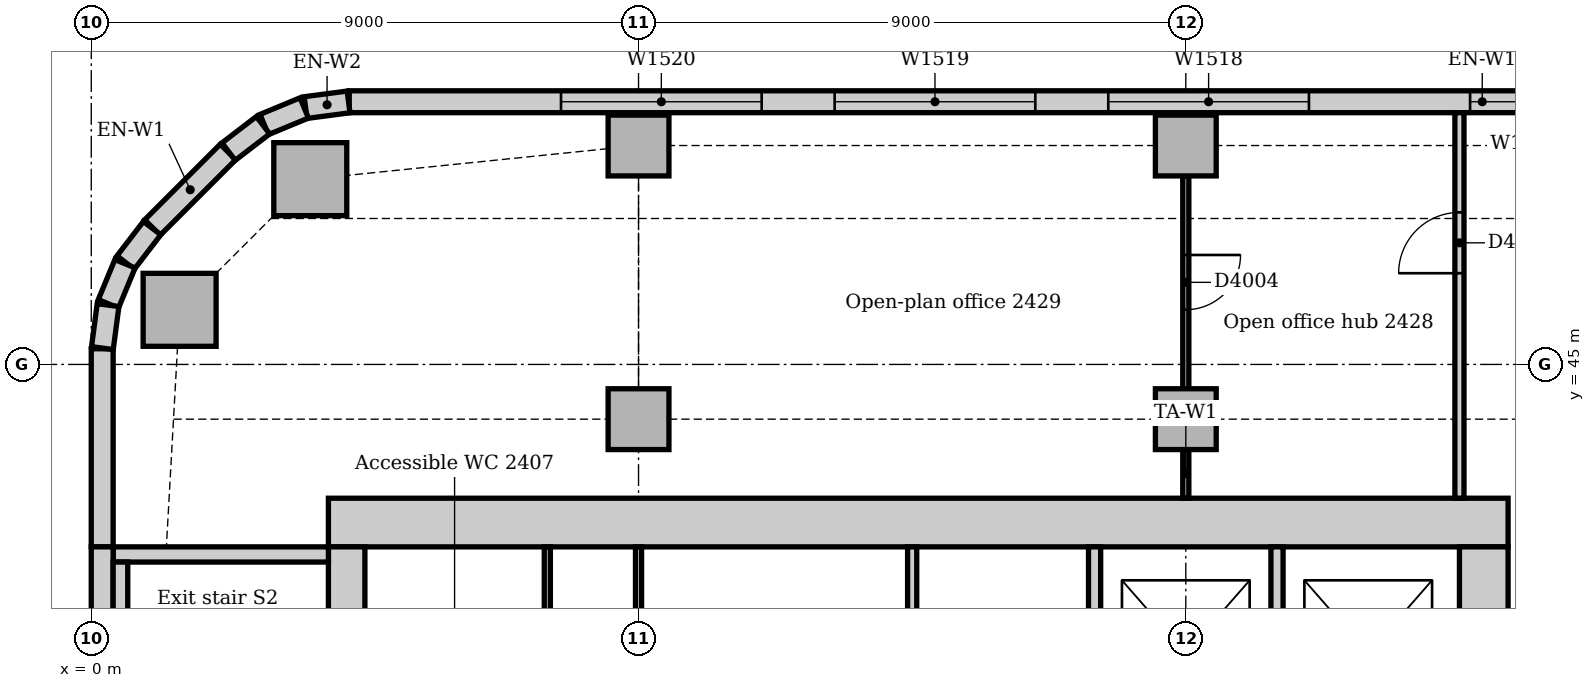
"""IFC4 building model, lengths in metres.
Left out: names, types, materials, properties, quantities, classifications, styles, units other than length and angle.
Written with IfcOpenShell. Run it as: python <this file> out.ifc"""

import sys

from ifc_helpers import new_model, si_unit, direction, frame, frame_2d, origin, origin_2d, place, context, subcontext, project, spatial, rectangle, extrude, element, fill, save


model = new_model("IFC4")
c1 = context("Model", 3, precision=1e-05, world=origin(), true_north=direction((0.0, 1.0)))
c2 = subcontext(c1, "Body", "Model", "MODEL_VIEW")
j1 = project(units=[si_unit("LENGTHUNIT", "METRE"), si_unit("PLANEANGLEUNIT", "RADIAN")], contexts=[c1])
p1 = place(None, origin())
s1 = spatial("IfcSite", under=j1, at=p1, CompositionType="ELEMENT")
p2 = place(p1, origin())
s2 = spatial("IfcBuilding", under=s1, at=p2, CompositionType="ELEMENT")
p3 = place(p2, frame((0.0, 0.0, 104.0)))
s3 = spatial("IfcBuildingStorey", under=s2, at=p3, CompositionType="ELEMENT", Elevation=104.0)
p4 = place(p3, frame((23.3, 42.4, 0.0), z_axis=(0.0, 0.0, 1.0), x_axis=(-1.0, 0.0, 0.0)))
e1 = element("IfcWall", 1, at=p4, inside=s3, PredefinedType="SOLIDWALL", context=c2, shape_type="SweptSolid", body=[
    extrude(rectangle(XDim=19.4, YDim=0.8, at=frame_2d((9.7, 0.0))), origin(), (0.0, 0.0, 1.0), 4.0),
])
p5 = place(p3, frame((22.9, 31.5, 0.0), z_axis=(0.0, 0.0, 1.0), x_axis=(0.0, 1.0, 0.0)))
e2 = element("IfcWall", 2, at=p5, inside=s3, PredefinedType="SOLIDWALL", context=c2, shape_type="SweptSolid", body=[
    extrude(rectangle(XDim=10.5, YDim=0.8, at=frame_2d((5.25, 0.0))), origin(), (0.0, 0.0, 1.0), 4.0),
])
p6 = place(p5, frame((3.15, 0.0, 0.0)))
e3 = element("IfcOpeningElement", 3, at=p6, cuts=e2, PredefinedType="OPENING", context=c2, shape_type="SweptSolid", body=[
    extrude(rectangle(XDim=1.0, YDim=2.1, at=frame_2d((0.5, 1.05))), frame((0.0, 0.41, 0.0), z_axis=(0.0, -1.0, 0.0), x_axis=(1.0, 0.0, 0.0)), (0.0, 0.0, 1.0), 0.82),
])
p7 = place(p5, frame((5.2, 0.0, 0.0)))
e4 = element("IfcOpeningElement", 4, at=p7, cuts=e2, PredefinedType="OPENING", context=c2, shape_type="SweptSolid", body=[
    extrude(rectangle(XDim=1.0, YDim=2.1, at=frame_2d((0.5, 1.05))), frame((0.0, 0.41, 0.0), z_axis=(0.0, -1.0, 0.0), x_axis=(1.0, 0.0, 0.0)), (0.0, 0.0, 1.0), 0.82),
])
p8 = place(p3, frame((4.2, 42.0, 0.0), z_axis=(0.0, 0.0, 1.0), x_axis=(0.0, -1.0, 0.0)))
e5 = element("IfcWall", 5, at=p8, inside=s3, PredefinedType="SOLIDWALL", context=c2, shape_type="SweptSolid", body=[
    extrude(rectangle(XDim=10.5, YDim=0.6, at=frame_2d((5.25, 0.0))), origin(), (0.0, 0.0, 1.0), 4.0),
])
p9 = place(p8, frame((5.3, 0.0, 0.0)))
e6 = element("IfcOpeningElement", 6, at=p9, cuts=e5, PredefinedType="OPENING", context=c2, shape_type="SweptSolid", body=[
    extrude(rectangle(XDim=1.0, YDim=2.1, at=frame_2d((0.5, 1.05))), frame((0.0, 0.31, 0.0), z_axis=(0.0, -1.0, 0.0), x_axis=(1.0, 0.0, 0.0)), (0.0, 0.0, 1.0), 0.62),
])
p10 = place(p3, frame((3.9, 41.875, 0.0), z_axis=(0.0, 0.0, 1.0), x_axis=(-1.0, 0.0, 0.0)))
e7 = element("IfcWall", 7, at=p10, inside=s3, PredefinedType="SOLIDWALL", context=c2, shape_type="SweptSolid", body=[
    extrude(rectangle(XDim=3.54, YDim=0.25, at=frame_2d((1.77, 0.0))), origin(), (0.0, 0.0, 1.0), 4.0),
])
for number, where, z_axis, x_axis in (
    (8, (3.602, 48.047, 0.0), (0.0, 0.0, 1.0), (1.0, 0.0, 0.0)),
    (9, (1.453, 45.898, 0.0), (0.0, 0.0, 1.0), (1.0, 0.0, 0.0)),
):
    element("IfcColumn", number, at=place(p3, frame(where, z_axis=z_axis, x_axis=x_axis)), inside=s3, PredefinedType="COLUMN", context=c2, shape_type="SweptSolid", body=[
        extrude(rectangle(XDim=1.2, YDim=1.2, at=origin_2d()), origin(), (0.0, 0.0, 1.0), 3.85),
    ])
for number, where, z_axis, x_axis in (
    (10, (9.0, 48.6, 0.0), (0.0, 0.0, 1.0), (1.0, 0.0, 0.0)),
    (11, (18.0, 48.6, 0.0), (0.0, 0.0, 1.0), (1.0, 0.0, 0.0)),
    (12, (9.0, 44.1, 0.0), (0.0, 0.0, 1.0), (1.0, 0.0, 0.0)),
    (13, (18.0, 44.1, 0.0), (0.0, 0.0, 1.0), (1.0, 0.0, 0.0)),
):
    element("IfcColumn", number, at=place(p3, frame(where, z_axis=z_axis, x_axis=x_axis)), inside=s3, PredefinedType="COLUMN", context=c2, shape_type="SweptSolid", body=[
        extrude(rectangle(XDim=1.0, YDim=1.0, at=origin_2d()), origin(), (0.0, 0.0, 1.0), 3.85),
    ])
p11 = place(p3, frame((41.507, 49.32, 0.0), z_axis=(0.0, 0.0, 1.0), x_axis=(-1.0, 0.0, 0.0)))
e14 = element("IfcWall", 14, at=p11, inside=s3, PredefinedType="STANDARD", context=c2, shape_type="SweptSolid", body=[
    extrude(rectangle(XDim=37.265, YDim=0.36, at=frame_2d((18.632, 0.0))), origin(), (0.0, 0.0, 1.0), 3.85),
])
p12 = place(p11, frame((3.482, 0.0, 0.9)))
e15 = element("IfcOpeningElement", 15, at=p12, cuts=e14, PredefinedType="OPENING", context=c2, shape_type="SweptSolid", body=[
    extrude(rectangle(XDim=3.3, YDim=1.6, at=frame_2d((1.65, 0.8))), frame((0.0, 0.19, 0.0), z_axis=(0.0, -1.0, 0.0), x_axis=(1.0, 0.0, 0.0)), (0.0, 0.0, 1.0), 0.38),
])
p13 = place(p11, frame((7.982, 0.0, 0.9)))
e16 = element("IfcOpeningElement", 16, at=p13, cuts=e14, PredefinedType="OPENING", context=c2, shape_type="SweptSolid", body=[
    extrude(rectangle(XDim=3.3, YDim=1.6, at=frame_2d((1.65, 0.8))), frame((0.0, 0.19, 0.0), z_axis=(0.0, -1.0, 0.0), x_axis=(1.0, 0.0, 0.0)), (0.0, 0.0, 1.0), 0.38),
])
p14 = place(p11, frame((12.482, 0.0, 0.9)))
e17 = element("IfcOpeningElement", 17, at=p14, cuts=e14, PredefinedType="OPENING", context=c2, shape_type="SweptSolid", body=[
    extrude(rectangle(XDim=3.3, YDim=1.6, at=frame_2d((1.65, 0.8))), frame((0.0, 0.19, 0.0), z_axis=(0.0, -1.0, 0.0), x_axis=(1.0, 0.0, 0.0)), (0.0, 0.0, 1.0), 0.38),
])
p15 = place(p11, frame((17.032, 0.0, 0.9)))
e18 = element("IfcOpeningElement", 18, at=p15, cuts=e14, PredefinedType="OPENING", context=c2, shape_type="SweptSolid", body=[
    extrude(rectangle(XDim=1.8, YDim=1.6, at=frame_2d((0.9, 0.8))), frame((0.0, 0.19, 0.0), z_axis=(0.0, -1.0, 0.0), x_axis=(1.0, 0.0, 0.0)), (0.0, 0.0, 1.0), 0.38),
])
p16 = place(p11, frame((21.482, 0.0, 0.9)))
e19 = element("IfcOpeningElement", 19, at=p16, cuts=e14, PredefinedType="OPENING", context=c2, shape_type="SweptSolid", body=[
    extrude(rectangle(XDim=3.3, YDim=1.6, at=frame_2d((1.65, 0.8))), frame((0.0, 0.19, 0.0), z_axis=(0.0, -1.0, 0.0), x_axis=(1.0, 0.0, 0.0)), (0.0, 0.0, 1.0), 0.38),
])
p17 = place(p11, frame((25.982, 0.0, 0.9)))
e20 = element("IfcOpeningElement", 20, at=p17, cuts=e14, PredefinedType="OPENING", context=c2, shape_type="SweptSolid", body=[
    extrude(rectangle(XDim=3.3, YDim=1.6, at=frame_2d((1.65, 0.8))), frame((0.0, 0.19, 0.0), z_axis=(0.0, -1.0, 0.0), x_axis=(1.0, 0.0, 0.0)), (0.0, 0.0, 1.0), 0.38),
])
p18 = place(p11, frame((30.482, 0.0, 0.9)))
e21 = element("IfcOpeningElement", 21, at=p18, cuts=e14, PredefinedType="OPENING", context=c2, shape_type="SweptSolid", body=[
    extrude(rectangle(XDim=3.3, YDim=1.6, at=frame_2d((1.65, 0.8))), frame((0.0, 0.19, 0.0), z_axis=(0.0, -1.0, 0.0), x_axis=(1.0, 0.0, 0.0)), (0.0, 0.0, 1.0), 0.38),
])
p19 = place(p3, frame((2.249, 48.494, 0.0), z_axis=(0.0, 0.0, 1.0), x_axis=(-0.707106781187, -0.707106781187, 0.0)))
e22 = element("IfcWall", 22, at=p19, inside=s3, PredefinedType="STANDARD", context=c2, shape_type="SweptSolid", body=[
    extrude(rectangle(XDim=1.757, YDim=0.36, at=frame_2d((0.879, 0.0))), origin(), (0.0, 0.0, 1.0), 3.85),
])
p20 = place(p3, frame((0.18, 45.257, 0.0), z_axis=(0.0, 0.0, 1.0), x_axis=(0.0, -1.0, 0.0)))
e23 = element("IfcWall", 23, at=p20, inside=s3, PredefinedType="STANDARD", context=c2, shape_type="SweptSolid", body=[
    extrude(rectangle(XDim=3.257, YDim=0.36, at=frame_2d((1.629, 0.0))), origin(), (0.0, 0.0, 1.0), 3.85),
])
p21 = place(p3, frame((0.18, 42.0, 0.0), z_axis=(0.0, 0.0, 1.0), x_axis=(0.0, -1.0, 0.0)))
e24 = element("IfcWall", 24, at=p21, inside=s3, PredefinedType="STANDARD", context=c2, shape_type="SweptSolid", body=[
    extrude(rectangle(XDim=6.75, YDim=0.36, at=frame_2d((3.375, 0.0))), origin(), (0.0, 0.0, 1.0), 3.85),
])
for number, where, z_axis, x_axis in (
    (25, (4.231, 49.317, 0.0), (0.0, 0.0, 1.0), (-0.991, -0.131, 0.0)),
    (26, (3.503, 49.218, 0.0), (0.0, 0.0, 1.0), (-0.924, -0.383, 0.0)),
):
    element("IfcWall", number, at=place(p3, frame(where, z_axis=z_axis, x_axis=x_axis)), inside=s3, PredefinedType="STANDARD", context=c2, shape_type="SweptSolid", body=[
        extrude(rectangle(XDim=0.713, YDim=0.36, at=frame_2d((0.356, 0.0))), origin(), (0.0, 0.0, 1.0), 3.85),
    ])
for number, where, z_axis, x_axis in (
    (27, (2.825, 48.934, 0.0), (0.0, 0.0, 1.0), (-0.793, -0.609, 0.0)),
    (28, (1.0, 47.241, 0.0), (0.0, 0.0, 1.0), (-0.609, -0.793, 0.0)),
):
    element("IfcWall", number, at=place(p3, frame(where, z_axis=z_axis, x_axis=x_axis)), inside=s3, PredefinedType="STANDARD", context=c2, shape_type="SweptSolid", body=[
        extrude(rectangle(XDim=0.713, YDim=0.36, at=frame_2d((0.357, 0.0))), origin(), (0.0, 0.0, 1.0), 3.85),
    ])
for number, where, z_axis, x_axis in (
    (29, (0.555, 46.656, 0.0), (0.0, 0.0, 1.0), (-0.383, -0.924, 0.0)),
    (30, (0.276, 45.976, 0.0), (0.0, 0.0, 1.0), (-0.131, -0.991, 0.0)),
):
    element("IfcWall", number, at=place(p3, frame(where, z_axis=z_axis, x_axis=x_axis)), inside=s3, PredefinedType="STANDARD", context=c2, shape_type="SweptSolid", body=[
        extrude(rectangle(XDim=0.713, YDim=0.36, at=frame_2d((0.356, 0.0))), origin(), (0.0, 0.0, 1.0), 3.85),
    ])
p22 = place(p3, frame((0.48, 40.13, 0.0), z_axis=(0.0, 0.0, 1.0), x_axis=(0.0, 1.0, 0.0)))
e31 = element("IfcWall", 31, at=p22, inside=s3, PredefinedType="STANDARD", context=c2, shape_type="SweptSolid", body=[
    extrude(rectangle(XDim=1.62, YDim=0.24, at=frame_2d((0.81, 0.0))), origin(), (0.0, 0.0, 1.0), 4.0),
])
for number, where, z_axis, x_axis in (
    (32, (16.5, 38.6, 0.0), (0.0, 0.0, 1.0), (0.0, 1.0, 0.0)),
    (33, (19.5, 38.6, 0.0), (0.0, 0.0, 1.0), (0.0, 1.0, 0.0)),
):
    element("IfcWall", number, at=place(p3, frame(where, z_axis=z_axis, x_axis=x_axis)), inside=s3, PredefinedType="PARTITIONING", context=c2, shape_type="SweptSolid", body=[
        extrude(rectangle(XDim=3.4, YDim=0.2, at=frame_2d((1.7, 0.0))), origin(), (0.0, 0.0, 1.0), 3.85),
    ])
p23 = place(p3, frame((22.5, 42.8, 0.0), z_axis=(0.0, 0.0, 1.0), x_axis=(0.0, 1.0, 0.0)))
e34 = element("IfcWall", 34, at=p23, inside=s3, PredefinedType="PARTITIONING", context=c2, shape_type="SweptSolid", body=[
    extrude(rectangle(XDim=6.34, YDim=0.15, at=frame_2d((3.17, 0.0))), origin(), (0.0, 0.0, 1.0), 3.85),
])
p24 = place(p23, frame((3.7, 0.0, 0.0)))
e35 = element("IfcOpeningElement", 35, at=p24, cuts=e34, PredefinedType="OPENING", context=c2, shape_type="SweptSolid", body=[
    extrude(rectangle(XDim=1.0, YDim=2.1, at=frame_2d((0.5, 1.05))), frame((0.0, 0.085, 0.0), z_axis=(0.0, -1.0, 0.0), x_axis=(1.0, 0.0, 0.0)), (0.0, 0.0, 1.0), 0.17),
])
p25 = place(p3, frame((13.5, 38.575, 0.0), z_axis=(0.0, 0.0, 1.0), x_axis=(0.0, 1.0, 0.0)))
e36 = element("IfcWall", 36, at=p25, inside=s3, PredefinedType="PARTITIONING", context=c2, shape_type="SweptSolid", body=[
    extrude(rectangle(XDim=3.425, YDim=0.15, at=frame_2d((1.712, 0.0))), origin(), (0.0, 0.0, 1.0), 3.85),
])
p26 = place(p3, frame((18.0, 42.8, 0.0), z_axis=(0.0, 0.0, 1.0), x_axis=(0.0, 1.0, 0.0)))
e37 = element("IfcWall", 37, at=p26, inside=s3, PredefinedType="PARTITIONING", context=c2, shape_type="SweptSolid", body=[
    extrude(rectangle(XDim=0.8, YDim=0.1, at=frame_2d((0.4, 0.0))), origin(), (0.0, 0.0, 1.0), 3.85),
])
p27 = place(p3, frame((18.0, 44.6, 0.0), z_axis=(0.0, 0.0, 1.0), x_axis=(0.0, 1.0, 0.0)))
e38 = element("IfcWall", 38, at=p27, inside=s3, PredefinedType="PARTITIONING", context=c2, shape_type="SweptSolid", body=[
    extrude(rectangle(XDim=3.5, YDim=0.1, at=frame_2d((1.75, 0.0))), origin(), (0.0, 0.0, 1.0), 3.652),
])
p28 = place(p27, frame((1.3, 0.0, 0.0)))
e39 = element("IfcOpeningElement", 39, at=p28, cuts=e38, PredefinedType="OPENING", context=c2, shape_type="SweptSolid", body=[
    extrude(rectangle(XDim=0.9, YDim=2.1, at=frame_2d((0.45, 1.05))), frame((0.0, 0.06, 0.0), z_axis=(0.0, -1.0, 0.0), x_axis=(1.0, 0.0, 0.0)), (0.0, 0.0, 1.0), 0.12),
])
for number, where, z_axis, x_axis in (
    (40, (7.5, 38.575, 0.0), (0.0, 0.0, 1.0), (0.0, 1.0, 0.0)),
    (41, (9.0, 38.575, 0.0), (0.0, 0.0, 1.0), (0.0, 1.0, 0.0)),
):
    element("IfcWall", number, at=place(p3, frame(where, z_axis=z_axis, x_axis=x_axis)), inside=s3, PredefinedType="PARTITIONING", context=c2, shape_type="SweptSolid", body=[
        extrude(rectangle(XDim=3.425, YDim=0.1, at=frame_2d((1.712, 0.0))), origin(), (0.0, 0.0, 1.0), 3.85),
    ])
p29 = place(p15, origin())
e42 = element("IfcWindow", 42, at=p29, inside=s3, PartitioningType="SINGLE_PANEL", PredefinedType="WINDOW", context=c2, shape_type="SweptSolid", body=[
    extrude(rectangle(XDim=1.8, YDim=1.6, at=frame_2d((0.9, 0.8))), frame((0.0, 0.13, 0.0), z_axis=(0.0, -1.0, 0.0), x_axis=(1.0, 0.0, 0.0)), (0.0, 0.0, 1.0), 0.06),
])
fill(e18, e42)
p30 = place(p16, origin())
e43 = element("IfcWindow", 43, at=p30, inside=s3, PartitioningType="SINGLE_PANEL", PredefinedType="WINDOW", context=c2, shape_type="SweptSolid", body=[
    extrude(rectangle(XDim=3.3, YDim=1.6, at=frame_2d((1.65, 0.8))), frame((0.0, 0.13, 0.0), z_axis=(0.0, -1.0, 0.0), x_axis=(1.0, 0.0, 0.0)), (0.0, 0.0, 1.0), 0.06),
])
fill(e19, e43)
p31 = place(p17, origin())
e44 = element("IfcWindow", 44, at=p31, inside=s3, PartitioningType="SINGLE_PANEL", PredefinedType="WINDOW", context=c2, shape_type="SweptSolid", body=[
    extrude(rectangle(XDim=3.3, YDim=1.6, at=frame_2d((1.65, 0.8))), frame((0.0, 0.13, 0.0), z_axis=(0.0, -1.0, 0.0), x_axis=(1.0, 0.0, 0.0)), (0.0, 0.0, 1.0), 0.06),
])
fill(e20, e44)
p32 = place(p18, origin())
e45 = element("IfcWindow", 45, at=p32, inside=s3, PartitioningType="SINGLE_PANEL", PredefinedType="WINDOW", context=c2, shape_type="SweptSolid", body=[
    extrude(rectangle(XDim=3.3, YDim=1.6, at=frame_2d((1.65, 0.8))), frame((0.0, 0.13, 0.0), z_axis=(0.0, -1.0, 0.0), x_axis=(1.0, 0.0, 0.0)), (0.0, 0.0, 1.0), 0.06),
])
fill(e21, e45)
p33 = place(p24, origin())
e46 = element("IfcDoor", 46, at=p33, inside=s3, OperationType="SINGLE_SWING_LEFT", PredefinedType="DOOR", context=c2, shape_type="SweptSolid", body=[
    extrude(rectangle(XDim=1.0, YDim=2.1, at=frame_2d((0.5, 1.05))), frame((0.0, 0.025, 0.0), z_axis=(0.0, -1.0, 0.0), x_axis=(1.0, 0.0, 0.0)), (0.0, 0.0, 1.0), 0.05),
])
fill(e35, e46)
p34 = place(p28, frame((0.9, 0.0, 0.0), z_axis=(0.0, 0.0, 1.0), x_axis=(-1.0, 0.0, 0.0)))
e47 = element("IfcDoor", 47, at=p34, inside=s3, OperationType="SINGLE_SWING_LEFT", PredefinedType="DOOR", context=c2, shape_type="SweptSolid", body=[
    extrude(rectangle(XDim=0.9, YDim=2.1, at=frame_2d((0.45, 1.05))), frame((0.0, 0.025, 0.0), z_axis=(0.0, -1.0, 0.0), x_axis=(1.0, 0.0, 0.0)), (0.0, 0.0, 1.0), 0.05),
])
fill(e39, e47)
save(model, sys.argv[1])
